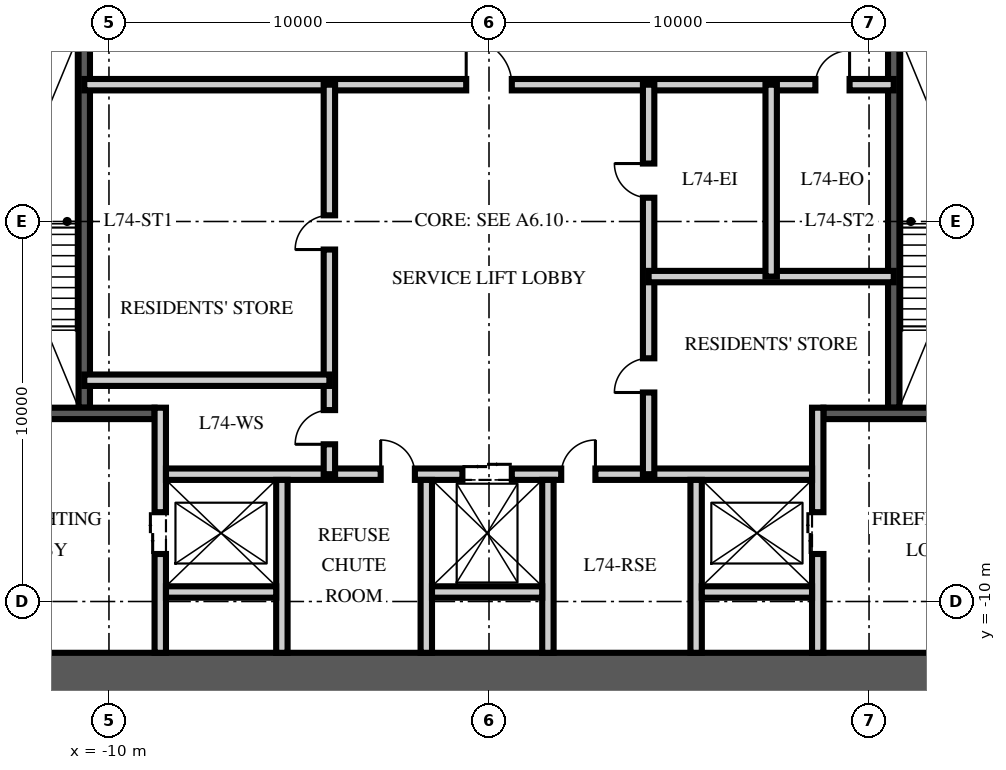
"""IFC4 building model, lengths in metres.
Left out: names, types, materials, properties, quantities, classifications, styles, units other than length and angle.
Written with IfcOpenShell. Run it as: python <this file> out.ifc"""

import sys

from ifc_helpers import new_model, si_unit, direction, frame, frame_2d, origin, place, context, subcontext, project, spatial, rectangle, extrude, element, fill, save


model = new_model("IFC4")
c1 = context("Model", 3, precision=1e-05, world=origin(), true_north=direction((0.0, 1.0)))
c2 = subcontext(c1, "Body", "Model", "MODEL_VIEW")
j1 = project(units=[si_unit("LENGTHUNIT", "METRE"), si_unit("PLANEANGLEUNIT", "RADIAN")], contexts=[c1])
p1 = place(None, origin())
s1 = spatial("IfcSite", under=j1, at=p1, CompositionType="ELEMENT")
p2 = place(p1, origin())
s2 = spatial("IfcBuilding", under=s1, at=p2, CompositionType="ELEMENT")
p3 = place(p2, frame((0.0, 0.0, 297.0)))
s3 = spatial("IfcBuildingStorey", under=s2, at=p3, CompositionType="ELEMENT", Elevation=297.0)
p4 = place(p3, frame((-15.5, -12.0, -0.25), z_axis=(0.0, 0.0, 1.0), x_axis=(1.0, 0.0, 0.0)))
e1 = element("IfcWall", 1, at=p4, inside=s3, PredefinedType="SHEAR", context=c2, shape_type="SweptSolid", body=[
    extrude(rectangle(XDim=31.0, YDim=1.3, at=frame_2d((15.5, 0.0))), origin(), (0.0, 0.0, 1.0), 3.75),
])
p5 = place(p3, frame((-10.65, -4.9, 0.0), z_axis=(0.0, 0.0, 1.0), x_axis=(0.0, 1.0, 0.0)))
e2 = element("IfcWall", 2, at=p5, inside=s3, PredefinedType="SOLIDWALL", context=c2, shape_type="SweptSolid", body=[
    extrude(rectangle(XDim=10.1, YDim=0.3, at=frame_2d((5.05, 0.0))), origin(), (0.0, 0.0, 1.0), 3.5),
])
p6 = place(p3, frame((-14.85, -5.05, 0.0), z_axis=(0.0, 0.0, 1.0), x_axis=(1.0, 0.0, 0.0)))
e3 = element("IfcWall", 3, at=p6, inside=s3, PredefinedType="SOLIDWALL", context=c2, shape_type="SweptSolid", body=[
    extrude(rectangle(XDim=6.05, YDim=0.3, at=frame_2d((3.025, 0.0))), origin(), (0.0, 0.0, 1.0), 3.5),
])
p7 = place(p6, frame((1.425, 0.0, 0.0)))
e4 = element("IfcOpeningElement", 4, at=p7, cuts=e3, PredefinedType="OPENING", context=c2, shape_type="SweptSolid", body=[
    extrude(rectangle(XDim=1.2, YDim=2.1, at=frame_2d((0.6, 1.05))), frame((0.0, 0.16, 0.0), z_axis=(0.0, -1.0, 0.0), x_axis=(1.0, 0.0, 0.0)), (0.0, 0.0, 1.0), 0.32),
])
p8 = place(p3, frame((-8.65, -11.35, 0.0), z_axis=(0.0, 0.0, 1.0), x_axis=(0.0, 1.0, 0.0)))
e5 = element("IfcWall", 5, at=p8, inside=s3, PredefinedType="PARTITIONING", context=c2, shape_type="SweptSolid", body=[
    extrude(rectangle(XDim=6.45, YDim=0.3, at=frame_2d((3.225, 0.0))), origin(), (0.0, 0.0, 1.0), 3.5),
])
p9 = place(p8, frame((2.6, 0.0, 0.0)))
e6 = element("IfcOpeningElement", 6, at=p9, cuts=e5, PredefinedType="OPENING", context=c2, shape_type="SweptSolid", body=[
    extrude(rectangle(XDim=1.1, YDim=2.1, at=frame_2d((0.55, 1.05))), frame((0.0, 0.16, 0.0), z_axis=(0.0, -1.0, 0.0), x_axis=(1.0, 0.0, 0.0)), (0.0, 0.0, 1.0), 0.32),
])
p10 = place(p3, frame((10.65, -4.9, 0.0), z_axis=(0.0, 0.0, 1.0), x_axis=(0.0, 1.0, 0.0)))
e7 = element("IfcWall", 7, at=p10, inside=s3, PredefinedType="SOLIDWALL", context=c2, shape_type="SweptSolid", body=[
    extrude(rectangle(XDim=10.1, YDim=0.3, at=frame_2d((5.05, 0.0))), origin(), (0.0, 0.0, 1.0), 3.5),
])
p11 = place(p3, frame((14.85, -5.05, 0.0), z_axis=(0.0, 0.0, 1.0), x_axis=(-1.0, 0.0, 0.0)))
e8 = element("IfcWall", 8, at=p11, inside=s3, PredefinedType="SOLIDWALL", context=c2, shape_type="SweptSolid", body=[
    extrude(rectangle(XDim=6.05, YDim=0.3, at=frame_2d((3.025, 0.0))), origin(), (0.0, 0.0, 1.0), 3.5),
])
p12 = place(p11, frame((1.425, 0.0, 0.0)))
e9 = element("IfcOpeningElement", 9, at=p12, cuts=e8, PredefinedType="OPENING", context=c2, shape_type="SweptSolid", body=[
    extrude(rectangle(XDim=1.2, YDim=2.1, at=frame_2d((0.6, 1.05))), frame((0.0, 0.16, 0.0), z_axis=(0.0, -1.0, 0.0), x_axis=(1.0, 0.0, 0.0)), (0.0, 0.0, 1.0), 0.32),
])
p13 = place(p3, frame((8.65, -11.35, 0.0), z_axis=(0.0, 0.0, 1.0), x_axis=(0.0, 1.0, 0.0)))
e10 = element("IfcWall", 10, at=p13, inside=s3, PredefinedType="PARTITIONING", context=c2, shape_type="SweptSolid", body=[
    extrude(rectangle(XDim=6.45, YDim=0.3, at=frame_2d((3.225, 0.0))), origin(), (0.0, 0.0, 1.0), 3.5),
])
p14 = place(p13, frame((2.6, 0.0, 0.0)))
e11 = element("IfcOpeningElement", 11, at=p14, cuts=e10, PredefinedType="OPENING", context=c2, shape_type="SweptSolid", body=[
    extrude(rectangle(XDim=1.1, YDim=2.1, at=frame_2d((0.55, 1.05))), frame((0.0, 0.16, 0.0), z_axis=(0.0, -1.0, 0.0), x_axis=(1.0, 0.0, 0.0)), (0.0, 0.0, 1.0), 0.32),
])
p15 = place(p3, frame((-8.5, -6.65, 0.0), z_axis=(0.0, 0.0, 1.0), x_axis=(1.0, 0.0, 0.0)))
e12 = element("IfcWall", 12, at=p15, inside=s3, PredefinedType="PARTITIONING", context=c2, shape_type="SweptSolid", body=[
    extrude(rectangle(XDim=17.0, YDim=0.3, at=frame_2d((8.5, 0.0))), origin(), (0.0, 0.0, 1.0), 3.5),
])
p16 = place(p15, frame((7.8, 0.0, 0.0)))
e13 = element("IfcOpeningElement", 13, at=p16, cuts=e12, PredefinedType="OPENING", context=c2, shape_type="SweptSolid", body=[
    extrude(rectangle(XDim=1.3, YDim=2.4, at=frame_2d((0.65, 1.2))), frame((0.0, 0.16, 0.0), z_axis=(0.0, -1.0, 0.0), x_axis=(1.0, 0.0, 0.0)), (0.0, 0.0, 1.0), 0.32),
])
p17 = place(p15, frame((5.65, 0.0, 0.0)))
e14 = element("IfcOpeningElement", 14, at=p17, cuts=e12, PredefinedType="OPENING", context=c2, shape_type="SweptSolid", body=[
    extrude(rectangle(XDim=0.9, YDim=2.1, at=frame_2d((0.45, 1.05))), frame((0.0, 0.16, 0.0), z_axis=(0.0, -1.0, 0.0), x_axis=(1.0, 0.0, 0.0)), (0.0, 0.0, 1.0), 0.32),
])
p18 = place(p15, frame((10.4, 0.0, 0.0)))
e15 = element("IfcOpeningElement", 15, at=p18, cuts=e12, PredefinedType="OPENING", context=c2, shape_type="SweptSolid", body=[
    extrude(rectangle(XDim=0.9, YDim=2.1, at=frame_2d((0.45, 1.05))), frame((0.0, 0.16, 0.0), z_axis=(0.0, -1.0, 0.0), x_axis=(1.0, 0.0, 0.0)), (0.0, 0.0, 1.0), 0.32),
])
for number, where, z_axis, x_axis in (
    (16, (-5.45, -11.35, 0.0), (0.0, 0.0, 1.0), (0.0, 1.0, 0.0)),
    (17, (-1.65, -11.35, 0.0), (0.0, 0.0, 1.0), (0.0, 1.0, 0.0)),
    (18, (1.55, -11.35, 0.0), (0.0, 0.0, 1.0), (0.0, 1.0, 0.0)),
    (19, (5.45, -11.35, 0.0), (0.0, 0.0, 1.0), (0.0, 1.0, 0.0)),
):
    element("IfcWall", number, at=place(p3, frame(where, z_axis=z_axis, x_axis=x_axis)), inside=s3, PredefinedType="PARTITIONING", context=c2, shape_type="SweptSolid", body=[
        extrude(rectangle(XDim=4.55, YDim=0.3, at=frame_2d((2.275, 0.0))), origin(), (0.0, 0.0, 1.0), 3.5),
    ])
for number, where, z_axis, x_axis in (
    (20, (-8.5, -9.75, 0.0), (0.0, 0.0, 1.0), (1.0, 0.0, 0.0)),
    (21, (-1.5, -9.75, 0.0), (0.0, 0.0, 1.0), (1.0, 0.0, 0.0)),
    (22, (5.6, -9.75, 0.0), (0.0, 0.0, 1.0), (1.0, 0.0, 0.0)),
):
    element("IfcWall", number, at=place(p3, frame(where, z_axis=z_axis, x_axis=x_axis)), inside=s3, PredefinedType="PARTITIONING", context=c2, shape_type="SweptSolid", body=[
        extrude(rectangle(XDim=2.9, YDim=0.3, at=frame_2d((1.45, 0.0))), origin(), (0.0, 0.0, 1.0), 3.5),
    ])
p19 = place(p3, frame((-10.65, 3.6, 0.0), z_axis=(0.0, 0.0, 1.0), x_axis=(1.0, 0.0, 0.0)))
e23 = element("IfcWall", 23, at=p19, inside=s3, PredefinedType="PARTITIONING", context=c2, shape_type="SweptSolid", body=[
    extrude(rectangle(XDim=21.3, YDim=0.3, at=frame_2d((10.65, 0.0))), origin(), (0.0, 0.0, 1.0), 3.5),
])
p20 = place(p19, frame((10.05, 0.0, 0.0)))
e24 = element("IfcOpeningElement", 24, at=p20, cuts=e23, PredefinedType="OPENING", context=c2, shape_type="SweptSolid", body=[
    extrude(rectangle(XDim=1.2, YDim=2.1, at=frame_2d((0.6, 1.05))), frame((0.0, 0.16, 0.0), z_axis=(0.0, -1.0, 0.0), x_axis=(1.0, 0.0, 0.0)), (0.0, 0.0, 1.0), 0.32),
])
p21 = place(p19, frame((19.238, 0.0, 0.0)))
e25 = element("IfcOpeningElement", 25, at=p21, cuts=e23, PredefinedType="OPENING", context=c2, shape_type="SweptSolid", body=[
    extrude(rectangle(XDim=0.9, YDim=2.1, at=frame_2d((0.45, 1.05))), frame((0.0, 0.16, 0.0), z_axis=(0.0, -1.0, 0.0), x_axis=(1.0, 0.0, 0.0)), (0.0, 0.0, 1.0), 0.32),
])
p22 = place(p3, frame((-4.2, -6.65, 0.0), z_axis=(0.0, 0.0, 1.0), x_axis=(0.0, 1.0, 0.0)))
e26 = element("IfcWall", 26, at=p22, inside=s3, PredefinedType="PARTITIONING", context=c2, shape_type="SweptSolid", body=[
    extrude(rectangle(XDim=10.25, YDim=0.3, at=frame_2d((5.125, 0.0))), origin(), (0.0, 0.0, 1.0), 3.5),
])
p23 = place(p22, frame((0.787, 0.0, 0.0)))
e27 = element("IfcOpeningElement", 27, at=p23, cuts=e26, PredefinedType="OPENING", context=c2, shape_type="SweptSolid", body=[
    extrude(rectangle(XDim=0.9, YDim=2.1, at=frame_2d((0.45, 1.05))), frame((0.0, 0.16, 0.0), z_axis=(0.0, -1.0, 0.0), x_axis=(1.0, 0.0, 0.0)), (0.0, 0.0, 1.0), 0.32),
])
p24 = place(p22, frame((5.912, 0.0, 0.0)))
e28 = element("IfcOpeningElement", 28, at=p24, cuts=e26, PredefinedType="OPENING", context=c2, shape_type="SweptSolid", body=[
    extrude(rectangle(XDim=0.9, YDim=2.1, at=frame_2d((0.45, 1.05))), frame((0.0, 0.16, 0.0), z_axis=(0.0, -1.0, 0.0), x_axis=(1.0, 0.0, 0.0)), (0.0, 0.0, 1.0), 0.32),
])
p25 = place(p3, frame((4.2, -6.65, 0.0), z_axis=(0.0, 0.0, 1.0), x_axis=(0.0, 1.0, 0.0)))
e29 = element("IfcWall", 29, at=p25, inside=s3, PredefinedType="PARTITIONING", context=c2, shape_type="SweptSolid", body=[
    extrude(rectangle(XDim=10.25, YDim=0.3, at=frame_2d((5.125, 0.0))), origin(), (0.0, 0.0, 1.0), 3.5),
])
p26 = place(p25, frame((2.15, 0.0, 0.0)))
e30 = element("IfcOpeningElement", 30, at=p26, cuts=e29, PredefinedType="OPENING", context=c2, shape_type="SweptSolid", body=[
    extrude(rectangle(XDim=0.9, YDim=2.1, at=frame_2d((0.45, 1.05))), frame((0.0, 0.16, 0.0), z_axis=(0.0, -1.0, 0.0), x_axis=(1.0, 0.0, 0.0)), (0.0, 0.0, 1.0), 0.32),
])
p27 = place(p25, frame((7.275, 0.0, 0.0)))
e31 = element("IfcOpeningElement", 31, at=p27, cuts=e29, PredefinedType="OPENING", context=c2, shape_type="SweptSolid", body=[
    extrude(rectangle(XDim=0.9, YDim=2.1, at=frame_2d((0.45, 1.05))), frame((0.0, 0.16, 0.0), z_axis=(0.0, -1.0, 0.0), x_axis=(1.0, 0.0, 0.0)), (0.0, 0.0, 1.0), 0.32),
])
for number, where, z_axis, x_axis in (
    (32, (-10.65, -4.177, 0.0), (0.0, 0.0, 1.0), (1.0, 0.0, 0.0)),
    (33, (10.65, -1.45, 0.0), (0.0, 0.0, 1.0), (-1.0, 0.0, 0.0)),
):
    element("IfcWall", number, at=place(p3, frame(where, z_axis=z_axis, x_axis=x_axis)), inside=s3, PredefinedType="PARTITIONING", context=c2, shape_type="SweptSolid", body=[
        extrude(rectangle(XDim=6.45, YDim=0.3, at=frame_2d((3.225, 0.0))), origin(), (0.0, 0.0, 1.0), 3.5),
    ])
p28 = place(p3, frame((7.425, -1.45, 0.0), z_axis=(0.0, 0.0, 1.0), x_axis=(0.0, 1.0, 0.0)))
e34 = element("IfcWall", 34, at=p28, inside=s3, PredefinedType="PARTITIONING", context=c2, shape_type="SweptSolid", body=[
    extrude(rectangle(XDim=5.05, YDim=0.3, at=frame_2d((2.525, 0.0))), origin(), (0.0, 0.0, 1.0), 3.5),
])
p29 = place(p9, origin())
e35 = element("IfcDoor", 35, at=p29, inside=s3, OperationType="DOUBLE_DOOR_SLIDING", PredefinedType="DOOR", context=c2, shape_type="SweptSolid", body=[
    extrude(rectangle(XDim=1.1, YDim=2.1, at=frame_2d((0.55, 1.05))), frame((0.0, 0.025, 0.0), z_axis=(0.0, -1.0, 0.0), x_axis=(1.0, 0.0, 0.0)), (0.0, 0.0, 1.0), 0.05),
])
fill(e6, e35)
p30 = place(p14, origin())
e36 = element("IfcDoor", 36, at=p30, inside=s3, OperationType="DOUBLE_DOOR_SLIDING", PredefinedType="DOOR", context=c2, shape_type="SweptSolid", body=[
    extrude(rectangle(XDim=1.1, YDim=2.1, at=frame_2d((0.55, 1.05))), frame((0.0, 0.025, 0.0), z_axis=(0.0, -1.0, 0.0), x_axis=(1.0, 0.0, 0.0)), (0.0, 0.0, 1.0), 0.05),
])
fill(e11, e36)
p31 = place(p16, origin())
e37 = element("IfcDoor", 37, at=p31, inside=s3, OperationType="DOUBLE_DOOR_SLIDING", PredefinedType="DOOR", context=c2, shape_type="SweptSolid", body=[
    extrude(rectangle(XDim=1.3, YDim=2.4, at=frame_2d((0.65, 1.2))), frame((0.0, 0.025, 0.0), z_axis=(0.0, -1.0, 0.0), x_axis=(1.0, 0.0, 0.0)), (0.0, 0.0, 1.0), 0.05),
])
fill(e13, e37)
p32 = place(p20, origin())
e38 = element("IfcDoor", 38, at=p32, inside=s3, OperationType="SINGLE_SWING_LEFT", PredefinedType="DOOR", context=c2, shape_type="SweptSolid", body=[
    extrude(rectangle(XDim=1.2, YDim=2.1, at=frame_2d((0.6, 1.05))), frame((0.0, 0.025, 0.0), z_axis=(0.0, -1.0, 0.0), x_axis=(1.0, 0.0, 0.0)), (0.0, 0.0, 1.0), 0.05),
])
fill(e24, e38)
p33 = place(p17, origin())
e39 = element("IfcDoor", 39, at=p33, inside=s3, OperationType="SINGLE_SWING_LEFT", PredefinedType="DOOR", context=c2, shape_type="SweptSolid", body=[
    extrude(rectangle(XDim=0.9, YDim=2.1, at=frame_2d((0.45, 1.05))), frame((0.0, 0.025, 0.0), z_axis=(0.0, -1.0, 0.0), x_axis=(1.0, 0.0, 0.0)), (0.0, 0.0, 1.0), 0.05),
])
fill(e14, e39)
p34 = place(p18, origin())
e40 = element("IfcDoor", 40, at=p34, inside=s3, OperationType="SINGLE_SWING_RIGHT", PredefinedType="DOOR", context=c2, shape_type="SweptSolid", body=[
    extrude(rectangle(XDim=0.9, YDim=2.1, at=frame_2d((0.45, 1.05))), frame((0.0, 0.025, 0.0), z_axis=(0.0, -1.0, 0.0), x_axis=(1.0, 0.0, 0.0)), (0.0, 0.0, 1.0), 0.05),
])
fill(e15, e40)
p35 = place(p23, origin())
e41 = element("IfcDoor", 41, at=p35, inside=s3, OperationType="SINGLE_SWING_LEFT", PredefinedType="DOOR", context=c2, shape_type="SweptSolid", body=[
    extrude(rectangle(XDim=0.9, YDim=2.1, at=frame_2d((0.45, 1.05))), frame((0.0, 0.025, 0.0), z_axis=(0.0, -1.0, 0.0), x_axis=(1.0, 0.0, 0.0)), (0.0, 0.0, 1.0), 0.05),
])
fill(e27, e41)
p36 = place(p24, origin())
e42 = element("IfcDoor", 42, at=p36, inside=s3, OperationType="SINGLE_SWING_LEFT", PredefinedType="DOOR", context=c2, shape_type="SweptSolid", body=[
    extrude(rectangle(XDim=0.9, YDim=2.1, at=frame_2d((0.45, 1.05))), frame((0.0, 0.025, 0.0), z_axis=(0.0, -1.0, 0.0), x_axis=(1.0, 0.0, 0.0)), (0.0, 0.0, 1.0), 0.05),
])
fill(e28, e42)
p37 = place(p26, origin())
e43 = element("IfcDoor", 43, at=p37, inside=s3, OperationType="SINGLE_SWING_LEFT", PredefinedType="DOOR", context=c2, shape_type="SweptSolid", body=[
    extrude(rectangle(XDim=0.9, YDim=2.1, at=frame_2d((0.45, 1.05))), frame((0.0, 0.025, 0.0), z_axis=(0.0, -1.0, 0.0), x_axis=(1.0, 0.0, 0.0)), (0.0, 0.0, 1.0), 0.05),
])
fill(e30, e43)
p38 = place(p27, origin())
e44 = element("IfcDoor", 44, at=p38, inside=s3, OperationType="SINGLE_SWING_RIGHT", PredefinedType="DOOR", context=c2, shape_type="SweptSolid", body=[
    extrude(rectangle(XDim=0.9, YDim=2.1, at=frame_2d((0.45, 1.05))), frame((0.0, 0.025, 0.0), z_axis=(0.0, -1.0, 0.0), x_axis=(1.0, 0.0, 0.0)), (0.0, 0.0, 1.0), 0.05),
])
fill(e31, e44)
p39 = place(p21, origin())
e45 = element("IfcDoor", 45, at=p39, inside=s3, OperationType="SINGLE_SWING_RIGHT", PredefinedType="DOOR", context=c2, shape_type="SweptSolid", body=[
    extrude(rectangle(XDim=0.9, YDim=2.1, at=frame_2d((0.45, 1.05))), frame((0.0, 0.025, 0.0), z_axis=(0.0, -1.0, 0.0), x_axis=(1.0, 0.0, 0.0)), (0.0, 0.0, 1.0), 0.05),
])
fill(e25, e45)
save(model, sys.argv[1])
